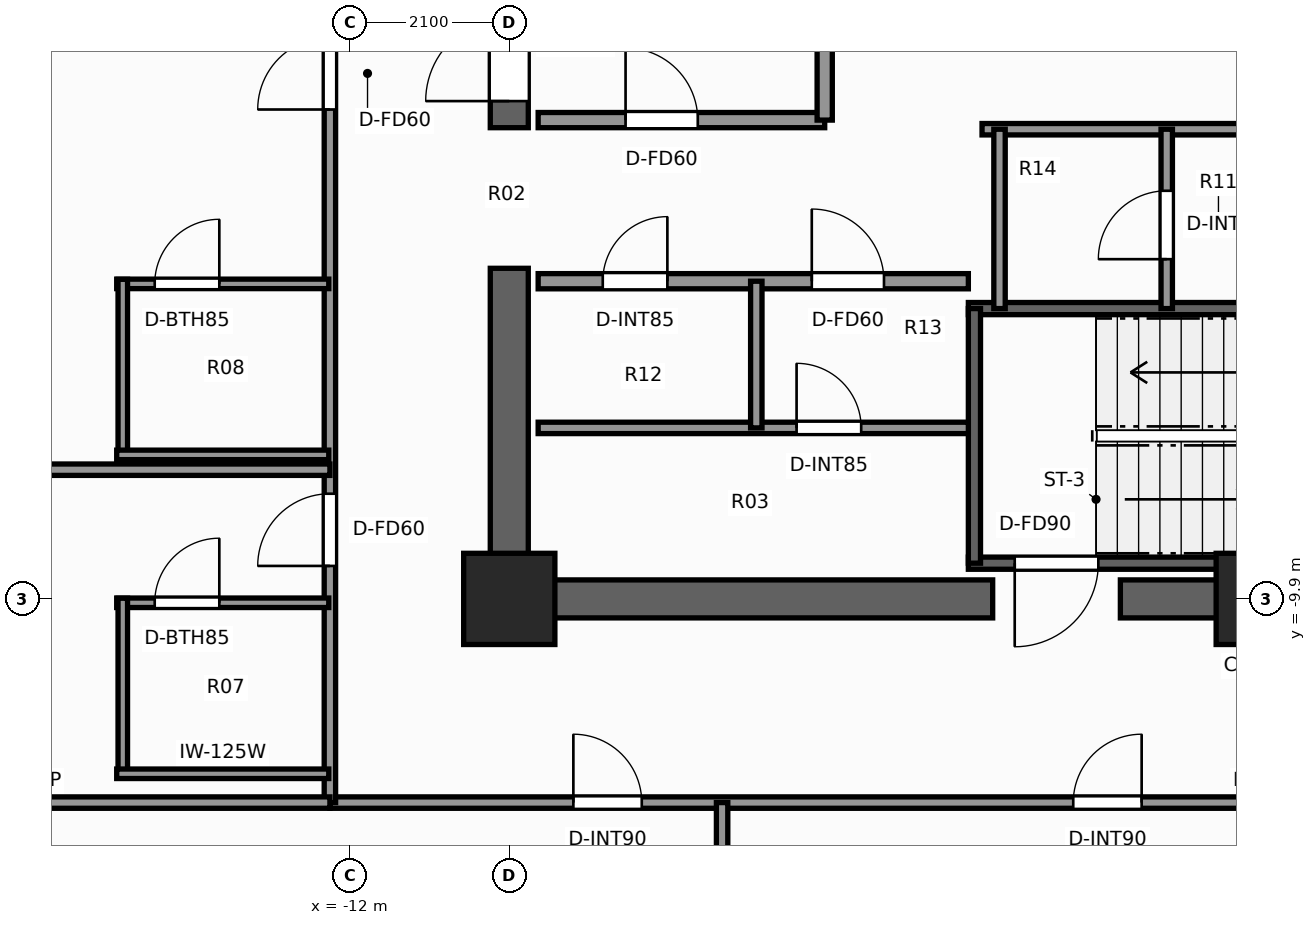
"""IFC4 building model, lengths in metres.
Left out: names, types, materials, properties, quantities, classifications, styles, units other than length and angle.
Written with IfcOpenShell. Run it as: python <this file> out.ifc"""

import sys

from ifc_helpers import new_model, si_unit, direction, frame, frame_2d, origin, origin_2d, place, context, subcontext, project, spatial, rectangle, extrude, element, fill, save


model = new_model("IFC4")
c1 = context("Model", 3, precision=1e-05, world=origin(), true_north=direction((0.0, 1.0)))
c2 = subcontext(c1, "Body", "Model", "MODEL_VIEW")
j1 = project(units=[si_unit("LENGTHUNIT", "METRE"), si_unit("PLANEANGLEUNIT", "RADIAN")], contexts=[c1])
p1 = place(None, origin())
s1 = spatial("IfcSite", under=j1, at=p1, CompositionType="ELEMENT")
p2 = place(p1, origin())
s2 = spatial("IfcBuilding", under=s1, at=p2, CompositionType="ELEMENT")
p3 = place(p2, frame((0.0, 0.0, 183.3)))
s3 = spatial("IfcBuildingStorey", under=s2, at=p3, CompositionType="ELEMENT", Elevation=183.3)
p4 = place(p3, frame((10.15, -9.9, 0.0), z_axis=(0.0, 0.0, 1.0), x_axis=(-1.0, 0.0, 0.0)))
e1 = element("IfcWall", 1, at=p4, inside=s3, PredefinedType="SHEAR", context=c2, shape_type="SweptSolid", body=[
    extrude(rectangle(XDim=12.01, YDim=0.5, at=frame_2d((6.005, 0.0))), origin(), (0.0, 0.0, 1.0), 3.3),
])
p5 = place(p3, frame((-3.54, -9.9, 0.0), z_axis=(0.0, 0.0, 1.0), x_axis=(-1.0, 0.0, 0.0)))
e2 = element("IfcWall", 2, at=p5, inside=s3, PredefinedType="SHEAR", context=c2, shape_type="SweptSolid", body=[
    extrude(rectangle(XDim=6.61, YDim=0.5, at=frame_2d((3.305, 0.0))), origin(), (0.0, 0.0, 1.0), 3.3),
])
p6 = place(p3, frame((-9.9, -9.65, 0.0), z_axis=(0.0, 0.0, 1.0), x_axis=(0.0, 1.0, 0.0)))
e3 = element("IfcWall", 3, at=p6, inside=s3, PredefinedType="SHEAR", context=c2, shape_type="SweptSolid", body=[
    extrude(rectangle(XDim=4.1, YDim=0.5, at=frame_2d((2.05, 0.0))), origin(), (0.0, 0.0, 1.0), 3.3),
])
p7 = place(p3, frame((-9.9, -3.7, 0.0), z_axis=(0.0, 0.0, 1.0), x_axis=(0.0, 1.0, 0.0)))
e4 = element("IfcWall", 4, at=p7, inside=s3, PredefinedType="SHEAR", context=c2, shape_type="SweptSolid", body=[
    extrude(rectangle(XDim=13.35, YDim=0.5, at=frame_2d((6.675, 0.0))), origin(), (0.0, 0.0, 1.0), 3.3),
])
p8 = place(p7, frame((0.35, 0.0, 0.0)))
e5 = element("IfcOpeningElement", 5, at=p8, cuts=e4, PredefinedType="OPENING", context=c2, shape_type="SweptSolid", body=[
    extrude(rectangle(XDim=1.1, YDim=2.2, at=frame_2d((0.55, 1.1))), frame((0.0, 0.26, 0.0), z_axis=(0.0, -1.0, 0.0), x_axis=(1.0, 0.0, 0.0)), (0.0, 0.0, 1.0), 0.52),
])
for number, where, z_axis, x_axis in (
    (6, (-9.9, -9.9, 0.0), (0.0, 0.0, 1.0), (1.0, 0.0, 0.0)),
    (7, (0.0, -9.9, 0.0), (0.0, 0.0, 1.0), (1.0, 0.0, 0.0)),
):
    element("IfcColumn", number, at=place(p3, frame(where, z_axis=z_axis, x_axis=x_axis)), inside=s3, PredefinedType="COLUMN", context=c2, shape_type="SweptSolid", body=[
        extrude(rectangle(XDim=1.2, YDim=1.2, at=origin_2d()), origin(), (0.0, 0.0, 1.0), 3.3),
    ])
p9 = place(p3, frame((3.86, -9.43, 0.0), z_axis=(0.0, 0.0, 1.0), x_axis=(-1.0, 0.0, 0.0)))
e8 = element("IfcWall", 8, at=p9, inside=s3, PredefinedType="SHEAR", context=c2, shape_type="SweptSolid", body=[
    extrude(rectangle(XDim=7.72, YDim=0.16, at=frame_2d((3.86, 0.0))), origin(), (0.0, 0.0, 1.0), 3.3),
])
p10 = place(p9, frame((6.01, 0.0, 0.0)))
e9 = element("IfcOpeningElement", 9, at=p10, cuts=e8, PredefinedType="OPENING", context=c2, shape_type="SweptSolid", body=[
    extrude(rectangle(XDim=1.1, YDim=2.2, at=frame_2d((0.55, 1.1))), frame((0.0, 0.09, 0.0), z_axis=(0.0, -1.0, 0.0), x_axis=(1.0, 0.0, 0.0)), (0.0, 0.0, 1.0), 0.18),
])
p11 = place(p3, frame((-3.86, -6.08, 0.0), z_axis=(0.0, 0.0, 1.0), x_axis=(1.0, 0.0, 0.0)))
e10 = element("IfcWall", 10, at=p11, inside=s3, PredefinedType="SHEAR", context=c2, shape_type="SweptSolid", body=[
    extrude(rectangle(XDim=7.72, YDim=0.16, at=frame_2d((3.86, 0.0))), origin(), (0.0, 0.0, 1.0), 3.3),
])
p12 = place(p3, frame((-3.78, -9.43, 0.0), z_axis=(0.0, 0.0, 1.0), x_axis=(0.0, 1.0, 0.0)))
e11 = element("IfcWall", 11, at=p12, inside=s3, PredefinedType="SHEAR", context=c2, shape_type="SweptSolid", body=[
    extrude(rectangle(XDim=3.35, YDim=0.16, at=frame_2d((1.675, 0.0))), origin(), (0.0, 0.0, 1.0), 3.3),
])
p13 = place(p3, frame((-9.52, -3.6, 0.0), z_axis=(0.0, 0.0, 1.0), x_axis=(1.0, 0.0, 0.0)))
e12 = element("IfcWall", 12, at=p13, inside=s3, PredefinedType="SOLIDWALL", context=c2, shape_type="SweptSolid", body=[
    extrude(rectangle(XDim=3.77, YDim=0.2, at=frame_2d((1.885, 0.0))), origin(), (0.0, 0.0, 1.0), 3.08),
])
p14 = place(p13, frame((1.15, 0.0, 0.0)))
e13 = element("IfcOpeningElement", 13, at=p14, cuts=e12, PredefinedType="OPENING", context=c2, shape_type="SweptSolid", body=[
    extrude(rectangle(XDim=0.95, YDim=2.06, at=frame_2d((0.475, 1.03))), frame((0.0, 0.11, 0.0), z_axis=(0.0, -1.0, 0.0), x_axis=(1.0, 0.0, 0.0)), (0.0, 0.0, 1.0), 0.22),
])
p15 = place(p3, frame((-5.75, -3.6, 0.0), z_axis=(0.0, 0.0, 1.0), x_axis=(0.0, 1.0, 0.0)))
e14 = element("IfcWall", 14, at=p15, inside=s3, PredefinedType="SOLIDWALL", context=c2, shape_type="SweptSolid", body=[
    extrude(rectangle(XDim=5.57, YDim=0.2, at=frame_2d((2.785, 0.0))), origin(), (0.0, 0.0, 1.0), 2.715),
])
p16 = place(p15, frame((2.75, 0.0, 0.0)))
e15 = element("IfcOpeningElement", 15, at=p16, cuts=e14, PredefinedType="OPENING", context=c2, shape_type="SweptSolid", body=[
    extrude(rectangle(XDim=1.1, YDim=2.2, at=frame_2d((0.55, 1.1))), frame((0.0, 0.11, 0.0), z_axis=(0.0, -1.0, 0.0), x_axis=(1.0, 0.0, 0.0)), (0.0, 0.0, 1.0), 0.22),
])
p17 = place(p3, frame((-9.52, -5.72, 0.0), z_axis=(0.0, 0.0, 1.0), x_axis=(1.0, 0.0, 0.0)))
e16 = element("IfcWall", 16, at=p17, inside=s3, PredefinedType="SOLIDWALL", context=c2, shape_type="SweptSolid", body=[
    extrude(rectangle(XDim=5.66, YDim=0.2, at=frame_2d((2.83, 0.0))), origin(), (0.0, 0.0, 1.0), 3.08),
])
p18 = place(p17, frame((3.6, 0.0, 0.0)))
e17 = element("IfcOpeningElement", 17, at=p18, cuts=e16, PredefinedType="OPENING", context=c2, shape_type="SweptSolid", body=[
    extrude(rectangle(XDim=0.95, YDim=2.06, at=frame_2d((0.475, 1.03))), frame((0.0, 0.11, 0.0), z_axis=(0.0, -1.0, 0.0), x_axis=(1.0, 0.0, 0.0)), (0.0, 0.0, 1.0), 0.22),
])
p19 = place(p17, frame((0.85, 0.0, 0.0)))
e18 = element("IfcOpeningElement", 18, at=p19, cuts=e16, PredefinedType="OPENING", context=c2, shape_type="SweptSolid", body=[
    extrude(rectangle(XDim=0.85, YDim=2.03, at=frame_2d((0.425, 1.015))), frame((0.0, 0.11, 0.0), z_axis=(0.0, -1.0, 0.0), x_axis=(1.0, 0.0, 0.0)), (0.0, 0.0, 1.0), 0.22),
])
p20 = place(p3, frame((-9.52, -7.65, 0.0), z_axis=(0.0, 0.0, 1.0), x_axis=(1.0, 0.0, 0.0)))
e19 = element("IfcWall", 19, at=p20, inside=s3, PredefinedType="PARTITIONING", context=c2, shape_type="SweptSolid", body=[
    extrude(rectangle(XDim=5.66, YDim=0.15, at=frame_2d((2.83, 0.0))), origin(), (0.0, 0.0, 1.0), 3.08),
])
p21 = place(p20, frame((3.4, 0.0, 0.0)))
e20 = element("IfcOpeningElement", 20, at=p21, cuts=e19, PredefinedType="OPENING", context=c2, shape_type="SweptSolid", body=[
    extrude(rectangle(XDim=0.85, YDim=2.03, at=frame_2d((0.425, 1.015))), frame((0.0, 0.085, 0.0), z_axis=(0.0, -1.0, 0.0), x_axis=(1.0, 0.0, 0.0)), (0.0, 0.0, 1.0), 0.17),
])
p22 = place(p3, frame((-6.65, -7.65, 0.0), z_axis=(0.0, 0.0, 1.0), x_axis=(0.0, 1.0, 0.0)))
e21 = element("IfcWall", 21, at=p22, inside=s3, PredefinedType="PARTITIONING", context=c2, shape_type="SweptSolid", body=[
    extrude(rectangle(XDim=1.93, YDim=0.15, at=frame_2d((0.965, 0.0))), origin(), (0.0, 0.0, 1.0), 3.08),
])
p23 = place(p3, frame((-3.68, -3.72, 0.0), z_axis=(0.0, 0.0, 1.0), x_axis=(1.0, 0.0, 0.0)))
e22 = element("IfcWall", 22, at=p23, inside=s3, PredefinedType="PARTITIONING", context=c2, shape_type="SweptSolid", body=[
    extrude(rectangle(XDim=7.36, YDim=0.15, at=frame_2d((3.68, 0.0))), origin(), (0.0, 0.0, 1.0), 3.08),
])
p24 = place(p3, frame((-3.45, -6.08, 0.0), z_axis=(0.0, 0.0, 1.0), x_axis=(0.0, 1.0, 0.0)))
e23 = element("IfcWall", 23, at=p24, inside=s3, PredefinedType="PARTITIONING", context=c2, shape_type="SweptSolid", body=[
    extrude(rectangle(XDim=2.36, YDim=0.15, at=frame_2d((1.18, 0.0))), origin(), (0.0, 0.0, 1.0), 3.08),
])
p25 = place(p3, frame((-1.25, -6.08, 0.0), z_axis=(0.0, 0.0, 1.0), x_axis=(0.0, 1.0, 0.0)))
e24 = element("IfcWall", 24, at=p25, inside=s3, PredefinedType="PARTITIONING", context=c2, shape_type="SweptSolid", body=[
    extrude(rectangle(XDim=2.36, YDim=0.15, at=frame_2d((1.18, 0.0))), origin(), (0.0, 0.0, 1.0), 3.08),
])
p26 = place(p25, frame((0.65, 0.0, 0.0)))
e25 = element("IfcOpeningElement", 25, at=p26, cuts=e24, PredefinedType="OPENING", context=c2, shape_type="SweptSolid", body=[
    extrude(rectangle(XDim=0.9, YDim=2.06, at=frame_2d((0.45, 1.03))), frame((0.0, 0.085, 0.0), z_axis=(0.0, -1.0, 0.0), x_axis=(1.0, 0.0, 0.0)), (0.0, 0.0, 1.0), 0.17),
])
p27 = place(p3, frame((-12.26, -12.58, 0.0), z_axis=(0.0, 0.0, 1.0), x_axis=(1.0, 0.0, 0.0)))
e26 = element("IfcWall", 26, at=p27, inside=s3, PredefinedType="PARTITIONING", context=c2, shape_type="SweptSolid", body=[
    extrude(rectangle(XDim=24.84, YDim=0.15, at=frame_2d((12.42, 0.0))), origin(), (0.0, 0.0, 1.0), 2.369),
])
p28 = place(p27, frame((3.203, 0.0, 0.0)))
e27 = element("IfcOpeningElement", 27, at=p28, cuts=e26, PredefinedType="OPENING", context=c2, shape_type="SweptSolid", body=[
    extrude(rectangle(XDim=0.9, YDim=2.06, at=frame_2d((0.45, 1.03))), frame((0.0, 0.085, 0.0), z_axis=(0.0, -1.0, 0.0), x_axis=(1.0, 0.0, 0.0)), (0.0, 0.0, 1.0), 0.17),
])
p29 = place(p27, frame((9.78, 0.0, 0.0)))
e28 = element("IfcOpeningElement", 28, at=p29, cuts=e26, PredefinedType="OPENING", context=c2, shape_type="SweptSolid", body=[
    extrude(rectangle(XDim=0.9, YDim=2.06, at=frame_2d((0.45, 1.03))), frame((0.0, 0.085, 0.0), z_axis=(0.0, -1.0, 0.0), x_axis=(1.0, 0.0, 0.0)), (0.0, 0.0, 1.0), 0.17),
])
p30 = place(p27, frame((19.345, 0.0, 0.0)))
e29 = element("IfcOpeningElement", 29, at=p30, cuts=e26, PredefinedType="OPENING", context=c2, shape_type="SweptSolid", body=[
    extrude(rectangle(XDim=0.9, YDim=2.06, at=frame_2d((0.45, 1.03))), frame((0.0, 0.085, 0.0), z_axis=(0.0, -1.0, 0.0), x_axis=(1.0, 0.0, 0.0)), (0.0, 0.0, 1.0), 0.17),
])
p31 = place(p3, frame((-12.26, -12.58, 0.0), z_axis=(0.0, 0.0, 1.0), x_axis=(0.0, 1.0, 0.0)))
e30 = element("IfcWall", 30, at=p31, inside=s3, PredefinedType="PARTITIONING", context=c2, shape_type="SweptSolid", body=[
    extrude(rectangle(XDim=24.84, YDim=0.15, at=frame_2d((12.42, 0.0))), origin(), (0.0, 0.0, 1.0), 2.369),
])
p32 = place(p31, frame((3.114, 0.0, 0.0)))
e31 = element("IfcOpeningElement", 31, at=p32, cuts=e30, PredefinedType="OPENING", context=c2, shape_type="SweptSolid", body=[
    extrude(rectangle(XDim=0.95, YDim=2.06, at=frame_2d((0.475, 1.03))), frame((0.0, 0.085, 0.0), z_axis=(0.0, -1.0, 0.0), x_axis=(1.0, 0.0, 0.0)), (0.0, 0.0, 1.0), 0.17),
])
p33 = place(p31, frame((9.119, 0.0, 0.0)))
e32 = element("IfcOpeningElement", 32, at=p33, cuts=e30, PredefinedType="OPENING", context=c2, shape_type="SweptSolid", body=[
    extrude(rectangle(XDim=0.95, YDim=2.06, at=frame_2d((0.475, 1.03))), frame((0.0, 0.085, 0.0), z_axis=(0.0, -1.0, 0.0), x_axis=(1.0, 0.0, 0.0)), (0.0, 0.0, 1.0), 0.17),
])
p34 = place(p31, frame((14.24, 0.0, 0.0)))
e33 = element("IfcOpeningElement", 33, at=p34, cuts=e30, PredefinedType="OPENING", context=c2, shape_type="SweptSolid", body=[
    extrude(rectangle(XDim=0.95, YDim=2.06, at=frame_2d((0.475, 1.03))), frame((0.0, 0.085, 0.0), z_axis=(0.0, -1.0, 0.0), x_axis=(1.0, 0.0, 0.0)), (0.0, 0.0, 1.0), 0.17),
])
p35 = place(p31, frame((19.574, 0.0, 0.0)))
e34 = element("IfcOpeningElement", 34, at=p35, cuts=e30, PredefinedType="OPENING", context=c2, shape_type="SweptSolid", body=[
    extrude(rectangle(XDim=0.95, YDim=2.06, at=frame_2d((0.475, 1.03))), frame((0.0, 0.085, 0.0), z_axis=(0.0, -1.0, 0.0), x_axis=(1.0, 0.0, 0.0)), (0.0, 0.0, 1.0), 0.17),
])
p36 = place(p31, frame((21.254, 0.0, 0.0)))
e35 = element("IfcOpeningElement", 35, at=p36, cuts=e30, PredefinedType="OPENING", context=c2, shape_type="SweptSolid", body=[
    extrude(rectangle(XDim=0.9, YDim=2.06, at=frame_2d((0.45, 1.03))), frame((0.0, 0.085, 0.0), z_axis=(0.0, -1.0, 0.0), x_axis=(1.0, 0.0, 0.0)), (0.0, 0.0, 1.0), 0.17),
])
p37 = place(p3, frame((-20.38, -12.58, 0.0), z_axis=(0.0, 0.0, 1.0), x_axis=(1.0, 0.0, 0.0)))
e36 = element("IfcWall", 36, at=p37, inside=s3, PredefinedType="PARTITIONING", context=c2, shape_type="SweptSolid", body=[
    extrude(rectangle(XDim=8.12, YDim=0.15, at=frame_2d((4.06, 0.0))), origin(), (0.0, 0.0, 1.0), 2.369),
])
p38 = place(p3, frame((-7.1, -20.38, 0.0), z_axis=(0.0, 0.0, 1.0), x_axis=(0.0, 1.0, 0.0)))
e37 = element("IfcWall", 37, at=p38, inside=s3, PredefinedType="PARTITIONING", context=c2, shape_type="SweptSolid", body=[
    extrude(rectangle(XDim=7.8, YDim=0.15, at=frame_2d((3.9, 0.0))), origin(), (0.0, 0.0, 1.0), 2.453),
])
p39 = place(p3, frame((-20.38, -8.2, 0.0), z_axis=(0.0, 0.0, 1.0), x_axis=(1.0, 0.0, 0.0)))
e38 = element("IfcWall", 38, at=p39, inside=s3, PredefinedType="PARTITIONING", context=c2, shape_type="SweptSolid", body=[
    extrude(rectangle(XDim=8.12, YDim=0.15, at=frame_2d((4.06, 0.0))), origin(), (0.0, 0.0, 1.0), 2.453),
])
p40 = place(p3, frame((-15.065, -9.951, 0.0), z_axis=(0.0, 0.0, 1.0), x_axis=(1.0, 0.0, 0.0)))
e39 = element("IfcWall", 39, at=p40, inside=s3, PredefinedType="PARTITIONING", context=c2, shape_type="SweptSolid", body=[
    extrude(rectangle(XDim=2.79, YDim=0.125, at=frame_2d((1.395, 0.0))), origin(), (0.0, 0.0, 1.0), 3.08),
])
p41 = place(p40, frame((0.5, 0.0, 0.0)))
e40 = element("IfcOpeningElement", 40, at=p41, cuts=e39, PredefinedType="OPENING", context=c2, shape_type="SweptSolid", body=[
    extrude(rectangle(XDim=0.85, YDim=2.03, at=frame_2d((0.425, 1.015))), frame((0.0, 0.073, 0.0), z_axis=(0.0, -1.0, 0.0), x_axis=(1.0, 0.0, 0.0)), (0.0, 0.0, 1.0), 0.145),
])
p42 = place(p3, frame((-14.985, -12.261, 0.0), z_axis=(0.0, 0.0, 1.0), x_axis=(0.0, 1.0, 0.0)))
e41 = element("IfcWall", 41, at=p42, inside=s3, PredefinedType="PARTITIONING", context=c2, shape_type="SweptSolid", body=[
    extrude(rectangle(XDim=2.37, YDim=0.125, at=frame_2d((1.185, 0.0))), origin(), (0.0, 0.0, 1.0), 2.369),
])
p43 = place(p3, frame((-15.065, -12.201, 0.0), z_axis=(0.0, 0.0, 1.0), x_axis=(1.0, 0.0, 0.0)))
e42 = element("IfcWall", 42, at=p43, inside=s3, PredefinedType="PARTITIONING", context=c2, shape_type="SweptSolid", body=[
    extrude(rectangle(XDim=2.79, YDim=0.125, at=frame_2d((1.395, 0.0))), origin(), (0.0, 0.0, 1.0), 3.08),
])
p44 = place(p3, frame((-15.065, -5.755, 0.0), z_axis=(0.0, 0.0, 1.0), x_axis=(1.0, 0.0, 0.0)))
e43 = element("IfcWall", 43, at=p44, inside=s3, PredefinedType="PARTITIONING", context=c2, shape_type="SweptSolid", body=[
    extrude(rectangle(XDim=2.79, YDim=0.125, at=frame_2d((1.395, 0.0))), origin(), (0.0, 0.0, 1.0), 3.08),
])
p45 = place(p44, frame((0.5, 0.0, 0.0)))
e44 = element("IfcOpeningElement", 44, at=p45, cuts=e43, PredefinedType="OPENING", context=c2, shape_type="SweptSolid", body=[
    extrude(rectangle(XDim=0.85, YDim=2.03, at=frame_2d((0.425, 1.015))), frame((0.0, 0.073, 0.0), z_axis=(0.0, -1.0, 0.0), x_axis=(1.0, 0.0, 0.0)), (0.0, 0.0, 1.0), 0.145),
])
p46 = place(p3, frame((-14.985, -8.065, 0.0), z_axis=(0.0, 0.0, 1.0), x_axis=(0.0, 1.0, 0.0)))
e45 = element("IfcWall", 45, at=p46, inside=s3, PredefinedType="PARTITIONING", context=c2, shape_type="SweptSolid", body=[
    extrude(rectangle(XDim=2.37, YDim=0.125, at=frame_2d((1.185, 0.0))), origin(), (0.0, 0.0, 1.0), 3.08),
])
p47 = place(p3, frame((-15.065, -8.005, 0.0), z_axis=(0.0, 0.0, 1.0), x_axis=(1.0, 0.0, 0.0)))
e46 = element("IfcWall", 46, at=p47, inside=s3, PredefinedType="PARTITIONING", context=c2, shape_type="SweptSolid", body=[
    extrude(rectangle(XDim=2.79, YDim=0.125, at=frame_2d((1.395, 0.0))), origin(), (0.0, 0.0, 1.0), 3.08),
])
p48 = place(p10, origin())
e47 = element("IfcDoor", 47, at=p48, inside=s3, OperationType="SINGLE_SWING_RIGHT", PredefinedType="DOOR", context=c2, shape_type="SweptSolid", body=[
    extrude(rectangle(XDim=1.1, YDim=2.2, at=frame_2d((0.55, 1.1))), frame((0.0, 0.025, 0.0), z_axis=(0.0, -1.0, 0.0), x_axis=(1.0, 0.0, 0.0)), (0.0, 0.0, 1.0), 0.05),
])
fill(e9, e47)
p49 = place(p8, origin())
e48 = element("IfcDoor", 48, at=p49, inside=s3, OperationType="SINGLE_SWING_LEFT", PredefinedType="DOOR", context=c2, shape_type="SweptSolid", body=[
    extrude(rectangle(XDim=1.1, YDim=2.2, at=frame_2d((0.55, 1.1))), frame((0.0, 0.025, 0.0), z_axis=(0.0, -1.0, 0.0), x_axis=(1.0, 0.0, 0.0)), (0.0, 0.0, 1.0), 0.05),
])
fill(e5, e48)
p50 = place(p18, origin())
e49 = element("IfcDoor", 49, at=p50, inside=s3, OperationType="SINGLE_SWING_LEFT", PredefinedType="DOOR", context=c2, shape_type="SweptSolid", body=[
    extrude(rectangle(XDim=0.95, YDim=2.06, at=frame_2d((0.475, 1.03))), frame((0.0, 0.025, 0.0), z_axis=(0.0, -1.0, 0.0), x_axis=(1.0, 0.0, 0.0)), (0.0, 0.0, 1.0), 0.05),
])
fill(e17, e49)
p51 = place(p19, origin())
e50 = element("IfcDoor", 50, at=p51, inside=s3, OperationType="SINGLE_SWING_RIGHT", PredefinedType="DOOR", context=c2, shape_type="SweptSolid", body=[
    extrude(rectangle(XDim=0.85, YDim=2.03, at=frame_2d((0.425, 1.015))), frame((0.0, 0.025, 0.0), z_axis=(0.0, -1.0, 0.0), x_axis=(1.0, 0.0, 0.0)), (0.0, 0.0, 1.0), 0.05),
])
fill(e18, e50)
p52 = place(p21, origin())
e51 = element("IfcDoor", 51, at=p52, inside=s3, OperationType="SINGLE_SWING_LEFT", PredefinedType="DOOR", context=c2, shape_type="SweptSolid", body=[
    extrude(rectangle(XDim=0.85, YDim=2.03, at=frame_2d((0.425, 1.015))), frame((0.0, 0.025, 0.0), z_axis=(0.0, -1.0, 0.0), x_axis=(1.0, 0.0, 0.0)), (0.0, 0.0, 1.0), 0.05),
])
fill(e20, e51)
p53 = place(p14, origin())
e52 = element("IfcDoor", 52, at=p53, inside=s3, OperationType="SINGLE_SWING_LEFT", PredefinedType="DOOR", context=c2, shape_type="SweptSolid", body=[
    extrude(rectangle(XDim=0.95, YDim=2.06, at=frame_2d((0.475, 1.03))), frame((0.0, 0.025, 0.0), z_axis=(0.0, -1.0, 0.0), x_axis=(1.0, 0.0, 0.0)), (0.0, 0.0, 1.0), 0.05),
])
fill(e13, e52)
p54 = place(p26, origin())
e53 = element("IfcDoor", 53, at=p54, inside=s3, OperationType="SINGLE_SWING_LEFT", PredefinedType="DOOR", context=c2, shape_type="SweptSolid", body=[
    extrude(rectangle(XDim=0.9, YDim=2.06, at=frame_2d((0.45, 1.03))), frame((0.0, 0.025, 0.0), z_axis=(0.0, -1.0, 0.0), x_axis=(1.0, 0.0, 0.0)), (0.0, 0.0, 1.0), 0.05),
])
fill(e25, e53)
p55 = place(p28, origin())
e54 = element("IfcDoor", 54, at=p55, inside=s3, OperationType="SINGLE_SWING_LEFT", PredefinedType="DOOR", context=c2, shape_type="SweptSolid", body=[
    extrude(rectangle(XDim=0.9, YDim=2.06, at=frame_2d((0.45, 1.03))), frame((0.0, 0.025, 0.0), z_axis=(0.0, -1.0, 0.0), x_axis=(1.0, 0.0, 0.0)), (0.0, 0.0, 1.0), 0.05),
])
fill(e27, e54)
p56 = place(p29, origin())
e55 = element("IfcDoor", 55, at=p56, inside=s3, OperationType="SINGLE_SWING_RIGHT", PredefinedType="DOOR", context=c2, shape_type="SweptSolid", body=[
    extrude(rectangle(XDim=0.9, YDim=2.06, at=frame_2d((0.45, 1.03))), frame((0.0, 0.025, 0.0), z_axis=(0.0, -1.0, 0.0), x_axis=(1.0, 0.0, 0.0)), (0.0, 0.0, 1.0), 0.05),
])
fill(e28, e55)
p57 = place(p41, origin())
e56 = element("IfcDoor", 56, at=p57, inside=s3, OperationType="SINGLE_SWING_RIGHT", PredefinedType="DOOR", context=c2, shape_type="SweptSolid", body=[
    extrude(rectangle(XDim=0.85, YDim=2.03, at=frame_2d((0.425, 1.015))), frame((0.0, 0.025, 0.0), z_axis=(0.0, -1.0, 0.0), x_axis=(1.0, 0.0, 0.0)), (0.0, 0.0, 1.0), 0.05),
])
fill(e40, e56)
p58 = place(p32, origin())
e57 = element("IfcDoor", 57, at=p58, inside=s3, OperationType="SINGLE_SWING_LEFT", PredefinedType="DOOR", context=c2, shape_type="SweptSolid", body=[
    extrude(rectangle(XDim=0.95, YDim=2.06, at=frame_2d((0.475, 1.03))), frame((0.0, 0.025, 0.0), z_axis=(0.0, -1.0, 0.0), x_axis=(1.0, 0.0, 0.0)), (0.0, 0.0, 1.0), 0.05),
])
fill(e31, e57)
p59 = place(p45, origin())
e58 = element("IfcDoor", 58, at=p59, inside=s3, OperationType="SINGLE_SWING_RIGHT", PredefinedType="DOOR", context=c2, shape_type="SweptSolid", body=[
    extrude(rectangle(XDim=0.85, YDim=2.03, at=frame_2d((0.425, 1.015))), frame((0.0, 0.025, 0.0), z_axis=(0.0, -1.0, 0.0), x_axis=(1.0, 0.0, 0.0)), (0.0, 0.0, 1.0), 0.05),
])
fill(e44, e58)
p60 = place(p33, origin())
e59 = element("IfcDoor", 59, at=p60, inside=s3, OperationType="SINGLE_SWING_LEFT", PredefinedType="DOOR", context=c2, shape_type="SweptSolid", body=[
    extrude(rectangle(XDim=0.95, YDim=2.06, at=frame_2d((0.475, 1.03))), frame((0.0, 0.025, 0.0), z_axis=(0.0, -1.0, 0.0), x_axis=(1.0, 0.0, 0.0)), (0.0, 0.0, 1.0), 0.05),
])
fill(e32, e59)
save(model, sys.argv[1])
